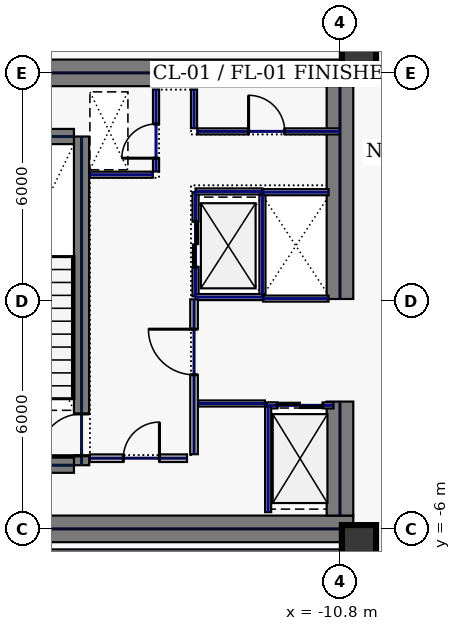
"""IFC4 building model, lengths in metres.
Left out: names, types, materials, properties, quantities, classifications, styles, units other than length and angle.
Written with IfcOpenShell. Run it as: python <this file> out.ifc"""

import sys

from ifc_helpers import new_model, si_unit, direction, frame, frame_2d, origin, origin_2d, place, context, subcontext, project, spatial, rectangle, hollow_rectangle, extrude, element, fill, save


model = new_model("IFC4")
c1 = context("Model", 3, precision=1e-05, world=origin(), true_north=direction((0.0, 1.0)))
c2 = subcontext(c1, "Body", "Model", "MODEL_VIEW")
j1 = project(units=[si_unit("LENGTHUNIT", "METRE"), si_unit("PLANEANGLEUNIT", "RADIAN")], contexts=[c1])
p1 = place(None, origin())
s1 = spatial("IfcSite", under=j1, at=p1, CompositionType="ELEMENT")
p2 = place(p1, origin())
s2 = spatial("IfcBuilding", under=s1, at=p2, CompositionType="ELEMENT")
p3 = place(p2, frame((0.0, 0.0, 200.2)))
s3 = spatial("IfcBuildingStorey", under=s2, at=p3, CompositionType="ELEMENT", Elevation=200.2)
for number, where, z_axis, x_axis in (
    (1, (-22.0, 6.0, 0.0), (0.0, 0.0, 1.0), (1.0, 0.0, 0.0)),
    (2, (-22.0, -6.0, 0.0), (0.0, 0.0, 1.0), (1.0, 0.0, 0.0)),
):
    element("IfcWall", number, at=place(p3, frame(where, z_axis=z_axis, x_axis=x_axis)), inside=s3, PredefinedType="SHEAR", context=c2, shape_type="SweptSolid", body=[
        extrude(rectangle(XDim=11.55, YDim=0.7, at=frame_2d((5.775, 0.0))), origin(), (0.0, 0.0, 1.0), 3.74),
    ])
p4 = place(p3, frame((-10.8, -5.65, 0.0), z_axis=(0.0, 0.0, 1.0), x_axis=(0.0, 1.0, 0.0)))
e3 = element("IfcWall", 3, at=p4, inside=s3, PredefinedType="SHEAR", context=c2, shape_type="SweptSolid", body=[
    extrude(rectangle(XDim=3.0, YDim=0.7, at=frame_2d((1.5, 0.0))), origin(), (0.0, 0.0, 1.0), 3.74),
])
p5 = place(p3, frame((-10.8, 0.05, 0.0), z_axis=(0.0, 0.0, 1.0), x_axis=(0.0, 1.0, 0.0)))
e4 = element("IfcWall", 4, at=p5, inside=s3, PredefinedType="SHEAR", context=c2, shape_type="SweptSolid", body=[
    extrude(rectangle(XDim=5.6, YDim=0.7, at=frame_2d((2.8, 0.0))), origin(), (0.0, 0.0, 1.0), 3.74),
])
p6 = place(p3, frame((-17.6, -4.325, 0.0), z_axis=(0.0, 0.0, 1.0), x_axis=(0.0, 1.0, 0.0)))
e5 = element("IfcWall", 5, at=p6, inside=s3, PredefinedType="SHEAR", context=c2, shape_type="SweptSolid", body=[
    extrude(rectangle(XDim=8.65, YDim=0.4, at=frame_2d((4.325, 0.0))), origin(), (0.0, 0.0, 1.0), 3.74),
])
p7 = place(p6, frame((0.25, 0.0, 0.0)))
e6 = element("IfcOpeningElement", 6, at=p7, cuts=e5, PredefinedType="OPENING", context=c2, shape_type="SweptSolid", body=[
    extrude(rectangle(XDim=1.1, YDim=2.2, at=frame_2d((0.55, 1.1))), frame((0.0, 0.21, 0.0), z_axis=(0.0, -1.0, 0.0), x_axis=(1.0, 0.0, 0.0)), (0.0, 0.0, 1.0), 0.42),
])
for number, where, z_axis, x_axis in (
    (7, (-21.2, -4.325, 0.0), (0.0, 0.0, 1.0), (1.0, 0.0, 0.0)),
    (8, (-21.2, 4.325, 0.0), (0.0, 0.0, 1.0), (1.0, 0.0, 0.0)),
):
    element("IfcWall", number, at=place(p3, frame(where, z_axis=z_axis, x_axis=x_axis)), inside=s3, PredefinedType="SHEAR", context=c2, shape_type="SweptSolid", body=[
        extrude(rectangle(XDim=3.4, YDim=0.4, at=frame_2d((1.7, 0.0))), origin(), (0.0, 0.0, 1.0), 3.74),
    ])
for number, where, z_axis, x_axis in (
    (9, (-10.3, -6.35, 0.0), (0.0, 0.0, 1.0), (1.0, 0.0, 0.0)),
    (10, (-10.3, 6.35, 0.0), (0.0, 0.0, 1.0), (1.0, 0.0, 0.0)),
):
    element("IfcColumn", number, at=place(p3, frame(where, z_axis=z_axis, x_axis=x_axis)), inside=s3, PredefinedType="COLUMN", context=c2, shape_type="SweptSolid", body=[
        extrude(hollow_rectangle(XDim=0.9, YDim=0.9, WallThickness=0.04, at=origin_2d()), origin(), (0.0, 0.0, 1.0), 3.74),
    ])
p8 = place(p3, frame((-14.6, 0.12, 0.0), z_axis=(0.0, 0.0, 1.0), x_axis=(0.0, 1.0, 0.0)))
e11 = element("IfcWall", 11, at=p8, inside=s3, PredefinedType="PARTITIONING", context=c2, shape_type="SweptSolid", body=[
    extrude(rectangle(XDim=2.74, YDim=0.16, at=frame_2d((1.37, 0.0))), origin(), (0.0, 0.0, 1.0), 3.74),
])
p9 = place(p8, frame((0.77, 0.0, 0.0)))
e12 = element("IfcOpeningElement", 12, at=p9, cuts=e11, PredefinedType="OPENING", context=c2, shape_type="SweptSolid", body=[
    extrude(rectangle(XDim=1.2, YDim=2.2, at=frame_2d((0.6, 1.1))), frame((0.0, 0.09, 0.0), z_axis=(0.0, -1.0, 0.0), x_axis=(1.0, 0.0, 0.0)), (0.0, 0.0, 1.0), 0.18),
])
for number, where, z_axis, x_axis in (
    (13, (-14.6, 0.1, 0.0), (0.0, 0.0, 1.0), (1.0, 0.0, 0.0)),
    (14, (-14.6, 2.88, 0.0), (0.0, 0.0, 1.0), (1.0, 0.0, 0.0)),
):
    element("IfcWall", number, at=place(p3, frame(where, z_axis=z_axis, x_axis=x_axis)), inside=s3, PredefinedType="PARTITIONING", context=c2, shape_type="SweptSolid", body=[
        extrude(rectangle(XDim=1.76, YDim=0.16, at=frame_2d((0.88, 0.0))), origin(), (0.0, 0.0, 1.0), 3.74),
    ])
p10 = place(p3, frame((-12.84, 0.18, 0.0), z_axis=(0.0, 0.0, 1.0), x_axis=(0.0, 1.0, 0.0)))
e15 = element("IfcWall", 15, at=p10, inside=s3, PredefinedType="PARTITIONING", context=c2, shape_type="SweptSolid", body=[
    extrude(rectangle(XDim=2.62, YDim=0.16, at=frame_2d((1.31, 0.0))), origin(), (0.0, 0.0, 1.0), 3.74),
])
p11 = place(p3, frame((-12.73, -2.75, 0.0), z_axis=(0.0, 0.0, 1.0), x_axis=(1.0, 0.0, 0.0)))
e16 = element("IfcWall", 16, at=p11, inside=s3, PredefinedType="PARTITIONING", context=c2, shape_type="SweptSolid", body=[
    extrude(rectangle(XDim=1.76, YDim=0.16, at=frame_2d((0.88, 0.0))), origin(), (0.0, 0.0, 1.0), 3.74),
])
p12 = place(p11, frame((0.28, 0.0, 0.0)))
e17 = element("IfcOpeningElement", 17, at=p12, cuts=e16, PredefinedType="OPENING", context=c2, shape_type="SweptSolid", body=[
    extrude(rectangle(XDim=1.2, YDim=2.2, at=frame_2d((0.6, 1.1))), frame((0.0, 0.09, 0.0), z_axis=(0.0, -1.0, 0.0), x_axis=(1.0, 0.0, 0.0)), (0.0, 0.0, 1.0), 0.18),
])
for number, where, z_axis, x_axis in (
    (18, (-12.82, 0.06, 0.0), (0.0, 0.0, 1.0), (1.0, 0.0, 0.0)),
    (19, (-12.82, 2.86, 0.0), (0.0, 0.0, 1.0), (1.0, 0.0, 0.0)),
):
    element("IfcWall", number, at=place(p3, frame(where, z_axis=z_axis, x_axis=x_axis)), inside=s3, PredefinedType="PARTITIONING", context=c2, shape_type="SweptSolid", body=[
        extrude(rectangle(XDim=1.72, YDim=0.16, at=frame_2d((0.86, 0.0))), origin(), (0.0, 0.0, 1.0), 3.74),
    ])
p13 = place(p3, frame((-15.64, 3.405, 0.0), z_axis=(0.0, 0.0, 1.0), x_axis=(0.0, 1.0, 0.0)))
e20 = element("IfcWall", 20, at=p13, inside=s3, PredefinedType="PARTITIONING", context=c2, shape_type="SweptSolid", body=[
    extrude(rectangle(XDim=2.155, YDim=0.16, at=frame_2d((1.078, 0.0))), origin(), (0.0, 0.0, 1.0), 3.74),
])
p14 = place(p13, frame((0.35, 0.0, 0.0)))
e21 = element("IfcOpeningElement", 21, at=p14, cuts=e20, PredefinedType="OPENING", context=c2, shape_type="SweptSolid", body=[
    extrude(rectangle(XDim=0.9, YDim=2.2, at=frame_2d((0.45, 1.1))), frame((0.0, 0.09, 0.0), z_axis=(0.0, -1.0, 0.0), x_axis=(1.0, 0.0, 0.0)), (0.0, 0.0, 1.0), 0.18),
])
p15 = place(p3, frame((-17.38, 3.32, 0.0), z_axis=(0.0, 0.0, 1.0), x_axis=(1.0, 0.0, 0.0)))
e22 = element("IfcWall", 22, at=p15, inside=s3, PredefinedType="PARTITIONING", context=c2, shape_type="SweptSolid", body=[
    extrude(rectangle(XDim=1.655, YDim=0.16, at=frame_2d((0.827, 0.0))), origin(), (0.0, 0.0, 1.0), 3.74),
])
p16 = place(p3, frame((-17.38, -4.14, 0.0), z_axis=(0.0, 0.0, 1.0), x_axis=(1.0, 0.0, 0.0)))
e23 = element("IfcWall", 23, at=p16, inside=s3, PredefinedType="SOLIDWALL", context=c2, shape_type="SweptSolid", body=[
    extrude(rectangle(XDim=2.555, YDim=0.2, at=frame_2d((1.277, 0.0))), origin(), (0.0, 0.0, 1.0), 3.74),
])
p17 = place(p16, frame((0.88, 0.0, 0.0)))
e24 = element("IfcOpeningElement", 24, at=p17, cuts=e23, PredefinedType="OPENING", context=c2, shape_type="SweptSolid", body=[
    extrude(rectangle(XDim=0.95, YDim=2.2, at=frame_2d((0.475, 1.1))), frame((0.0, 0.11, 0.0), z_axis=(0.0, -1.0, 0.0), x_axis=(1.0, 0.0, 0.0)), (0.0, 0.0, 1.0), 0.22),
])
p18 = place(p3, frame((-14.535, -2.7, 0.0), z_axis=(0.0, 0.0, 1.0), x_axis=(1.0, 0.0, 0.0)))
e25 = element("IfcWall", 25, at=p18, inside=s3, PredefinedType="PARTITIONING", context=c2, shape_type="SweptSolid", body=[
    extrude(rectangle(XDim=1.76, YDim=0.16, at=frame_2d((0.88, 0.0))), origin(), (0.0, 0.0, 1.0), 3.74),
])
p19 = place(p3, frame((-12.69, -5.56, 0.0), z_axis=(0.0, 0.0, 1.0), x_axis=(0.0, 1.0, 0.0)))
e26 = element("IfcWall", 26, at=p19, inside=s3, PredefinedType="PARTITIONING", context=c2, shape_type="SweptSolid", body=[
    extrude(rectangle(XDim=2.775, YDim=0.16, at=frame_2d((1.388, 0.0))), origin(), (0.0, 0.0, 1.0), 3.74),
])
p20 = place(p3, frame((-14.555, 4.46, 0.0), z_axis=(0.0, 0.0, 1.0), x_axis=(1.0, 0.0, 0.0)))
e27 = element("IfcWall", 27, at=p20, inside=s3, PredefinedType="PARTITIONING", context=c2, shape_type="SweptSolid", body=[
    extrude(rectangle(XDim=3.755, YDim=0.16, at=frame_2d((1.877, 0.0))), origin(), (0.0, 0.0, 1.0), 3.74),
])
p21 = place(p20, frame((1.35, 0.0, 0.0)))
e28 = element("IfcOpeningElement", 28, at=p21, cuts=e27, PredefinedType="OPENING", context=c2, shape_type="SweptSolid", body=[
    extrude(rectangle(XDim=0.95, YDim=2.2, at=frame_2d((0.475, 1.1))), frame((0.0, 0.09, 0.0), z_axis=(0.0, -1.0, 0.0), x_axis=(1.0, 0.0, 0.0)), (0.0, 0.0, 1.0), 0.18),
])
p22 = place(p3, frame((-14.64, 4.545, 0.0), z_axis=(0.0, 0.0, 1.0), x_axis=(0.0, 1.0, 0.0)))
e29 = element("IfcWall", 29, at=p22, inside=s3, PredefinedType="PARTITIONING", context=c2, shape_type="SweptSolid", body=[
    extrude(rectangle(XDim=1.015, YDim=0.16, at=frame_2d((0.508, 0.0))), origin(), (0.0, 0.0, 1.0), 3.74),
])
p23 = place(p3, frame((-14.64, -4.035, 0.0), z_axis=(0.0, 0.0, 1.0), x_axis=(0.0, 1.0, 0.0)))
e30 = element("IfcWall", 30, at=p23, inside=s3, PredefinedType="SOLIDWALL", context=c2, shape_type="SweptSolid", body=[
    extrude(rectangle(XDim=4.075, YDim=0.2, at=frame_2d((2.038, 0.0))), origin(), (0.0, 0.0, 1.0), 3.74),
])
p24 = place(p23, frame((2.09, 0.0, 0.0)))
e31 = element("IfcOpeningElement", 31, at=p24, cuts=e30, PredefinedType="OPENING", context=c2, shape_type="SweptSolid", body=[
    extrude(rectangle(XDim=1.2, YDim=2.2, at=frame_2d((0.6, 1.1))), frame((0.0, 0.11, 0.0), z_axis=(0.0, -1.0, 0.0), x_axis=(1.0, 0.0, 0.0)), (0.0, 0.0, 1.0), 0.22),
])
p25 = place(p3, frame((-24.965, -6.62, 0.0), z_axis=(0.0, 0.0, 1.0), x_axis=(1.0, 0.0, 0.0)))
e32 = element("IfcWall", 32, at=p25, inside=s3, PredefinedType="PARTITIONING", context=c2, shape_type="SweptSolid", body=[
    extrude(rectangle(XDim=14.335, YDim=0.16, at=frame_2d((7.167, 0.0))), origin(), (0.0, 0.0, 1.0), 3.74),
])
p26 = place(p7, origin())
e33 = element("IfcDoor", 33, at=p26, inside=s3, OperationType="SINGLE_SWING_LEFT", PredefinedType="DOOR", context=c2, shape_type="SweptSolid", body=[
    extrude(rectangle(XDim=1.1, YDim=2.2, at=frame_2d((0.55, 1.1))), frame((0.0, 0.025, 0.0), z_axis=(0.0, -1.0, 0.0), x_axis=(1.0, 0.0, 0.0)), (0.0, 0.0, 1.0), 0.05),
])
fill(e6, e33)
p27 = place(p9, origin())
e34 = element("IfcDoor", 34, at=p27, inside=s3, OperationType="SLIDING_TO_LEFT", PredefinedType="DOOR", context=c2, shape_type="SweptSolid", body=[
    extrude(rectangle(XDim=1.2, YDim=2.2, at=frame_2d((0.6, 1.1))), frame((0.0, 0.025, 0.0), z_axis=(0.0, -1.0, 0.0), x_axis=(1.0, 0.0, 0.0)), (0.0, 0.0, 1.0), 0.05),
])
fill(e12, e34)
p28 = place(p12, origin())
e35 = element("IfcDoor", 35, at=p28, inside=s3, OperationType="SLIDING_TO_LEFT", PredefinedType="DOOR", context=c2, shape_type="SweptSolid", body=[
    extrude(rectangle(XDim=1.2, YDim=2.2, at=frame_2d((0.6, 1.1))), frame((0.0, 0.025, 0.0), z_axis=(0.0, -1.0, 0.0), x_axis=(1.0, 0.0, 0.0)), (0.0, 0.0, 1.0), 0.05),
])
fill(e17, e35)
p29 = place(p14, origin())
e36 = element("IfcDoor", 36, at=p29, inside=s3, OperationType="SINGLE_SWING_LEFT", PredefinedType="DOOR", context=c2, shape_type="SweptSolid", body=[
    extrude(rectangle(XDim=0.9, YDim=2.2, at=frame_2d((0.45, 1.1))), frame((0.0, 0.025, 0.0), z_axis=(0.0, -1.0, 0.0), x_axis=(1.0, 0.0, 0.0)), (0.0, 0.0, 1.0), 0.05),
])
fill(e21, e36)
p30 = place(p17, origin())
e37 = element("IfcDoor", 37, at=p30, inside=s3, OperationType="SINGLE_SWING_RIGHT", PredefinedType="DOOR", context=c2, shape_type="SweptSolid", body=[
    extrude(rectangle(XDim=0.95, YDim=2.2, at=frame_2d((0.475, 1.1))), frame((0.0, 0.025, 0.0), z_axis=(0.0, -1.0, 0.0), x_axis=(1.0, 0.0, 0.0)), (0.0, 0.0, 1.0), 0.05),
])
fill(e24, e37)
p31 = place(p21, origin())
e38 = element("IfcDoor", 38, at=p31, inside=s3, OperationType="SINGLE_SWING_LEFT", PredefinedType="DOOR", context=c2, shape_type="SweptSolid", body=[
    extrude(rectangle(XDim=0.95, YDim=2.2, at=frame_2d((0.475, 1.1))), frame((0.0, 0.025, 0.0), z_axis=(0.0, -1.0, 0.0), x_axis=(1.0, 0.0, 0.0)), (0.0, 0.0, 1.0), 0.05),
])
fill(e28, e38)
p32 = place(p24, origin())
e39 = element("IfcDoor", 39, at=p32, inside=s3, OperationType="SINGLE_SWING_RIGHT", PredefinedType="DOOR", context=c2, shape_type="SweptSolid", body=[
    extrude(rectangle(XDim=1.2, YDim=2.2, at=frame_2d((0.6, 1.1))), frame((0.0, 0.025, 0.0), z_axis=(0.0, -1.0, 0.0), x_axis=(1.0, 0.0, 0.0)), (0.0, 0.0, 1.0), 0.05),
])
fill(e31, e39)
save(model, sys.argv[1])
